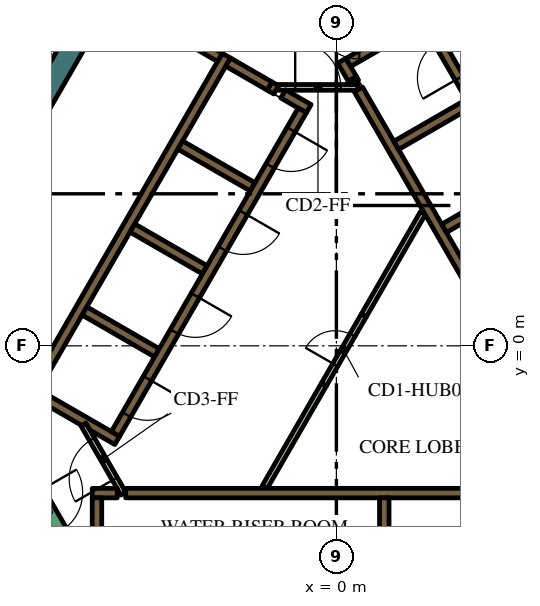
"""IFC4 building model, lengths in metres.
Left out: names, types, materials, properties, quantities, classifications, styles, units other than length and angle.
Written with IfcOpenShell. Run it as: python <this file> out.ifc"""

import sys

from ifc_helpers import new_model, si_unit, direction, frame, frame_2d, origin, place, context, subcontext, project, spatial, polyline, rectangle, outline, extrude, element, fill, save


model = new_model("IFC4")
c1 = context("Model", 3, precision=1e-05, world=origin(), true_north=direction((0.0, 1.0)))
c2 = subcontext(c1, "Body", "Model", "MODEL_VIEW")
j1 = project(units=[si_unit("LENGTHUNIT", "METRE"), si_unit("PLANEANGLEUNIT", "RADIAN")], contexts=[c1])
p1 = place(None, origin())
s1 = spatial("IfcSite", under=j1, at=p1, CompositionType="ELEMENT")
p2 = place(p1, origin())
s2 = spatial("IfcBuilding", under=s1, at=p2, CompositionType="ELEMENT")
p3 = place(p2, frame((0.0, 0.0, 309.0)))
s3 = spatial("IfcBuildingStorey", under=s2, at=p3, CompositionType="ELEMENT", Elevation=309.0)
p4 = place(p3, frame((1.989, 16.456, 0.0), z_axis=(0.0, 0.0, 1.0), x_axis=(0.49999102663, -0.8660305845, 0.0)))
e1 = element("IfcWall", 1, at=p4, inside=s3, PredefinedType="SOLIDWALL", context=c2, shape_type="SweptSolid", body=[
    extrude(rectangle(XDim=12.406, YDim=0.6, at=frame_2d((6.203, 0.0))), origin(), (0.0, 0.0, 1.0), 4.2),
])
p5 = place(p3, frame((-12.582, -1.892, 0.0), z_axis=(0.0, 0.0, 1.0), x_axis=(0.500003640647, 0.866023301845, 0.0)))
e2 = element("IfcWall", 2, at=p5, inside=s3, PredefinedType="SOLIDWALL", context=c2, shape_type="SweptSolid", body=[
    extrude(rectangle(XDim=15.858, YDim=0.6, at=frame_2d((7.929, 0.0))), origin(), (0.0, 0.0, 1.0), 4.2),
])
p6 = place(p3, frame((-5.545, -3.875, 0.0), z_axis=(0.0, 0.0, 1.0), x_axis=(1.0, 0.0, 0.0)))
e3 = element("IfcWall", 3, at=p6, inside=s3, PredefinedType="SOLIDWALL", context=c2, shape_type="SweptSolid", body=[
    extrude(rectangle(XDim=11.97, YDim=0.25, at=frame_2d((5.985, 0.0))), origin(), (0.0, 0.0, 1.0), 4.2),
])
p7 = place(p3, frame((-6.425, -3.875, 0.0), z_axis=(0.0, 0.0, 1.0), x_axis=(1.0, 0.0, 0.0)))
e4 = element("IfcWall", 4, at=p7, inside=s3, PredefinedType="SOLIDWALL", context=c2, shape_type="SweptSolid", body=[
    extrude(rectangle(XDim=0.658, YDim=0.25, at=frame_2d((0.329, 0.0))), origin(), (0.0, 0.0, 1.0), 4.2),
])
p8 = place(p3, frame((1.26, -4.0, 0.0), z_axis=(0.0, 0.0, 1.0), x_axis=(0.0, -1.0, 0.0)))
e5 = element("IfcWall", 5, at=p8, inside=s3, PredefinedType="SOLIDWALL", context=c2, shape_type="SweptSolid", body=[
    extrude(rectangle(XDim=2.2, YDim=0.25, at=frame_2d((1.1, 0.0))), origin(), (0.0, 0.0, 1.0), 4.2),
])
p9 = place(p3, frame((-6.3, -7.125, 0.0), z_axis=(0.0, 0.0, 1.0), x_axis=(0.0, 1.0, 0.0)))
e6 = element("IfcWall", 6, at=p9, inside=s3, PredefinedType="SOLIDWALL", context=c2, shape_type="SweptSolid", body=[
    extrude(rectangle(XDim=3.125, YDim=0.25, at=frame_2d((1.562, 0.0))), origin(), (0.0, 0.0, 1.0), 4.2),
])
p10 = place(p3, frame((0.473, 6.93, 0.0), z_axis=(0.0, 0.0, 1.0), x_axis=(-0.49972245349, 0.866185586049, 0.0)))
e7 = element("IfcWall", 7, at=p10, inside=s3, PredefinedType="SOLIDWALL", context=c2, shape_type="SweptSolid", body=[
    extrude(rectangle(XDim=0.11, YDim=0.25, at=frame_2d((0.055, 0.0))), origin(), (0.0, 0.0, 1.0), 4.2),
])
p11 = place(p3, frame((6.568, -3.627, 0.0), z_axis=(0.0, 0.0, 1.0), x_axis=(-0.499999455981, 0.866025717874, 0.0)))
e8 = element("IfcWall", 8, at=p11, inside=s3, PredefinedType="SOLIDWALL", context=c2, shape_type="SweptSolid", body=[
    extrude(rectangle(XDim=11.978, YDim=0.25, at=frame_2d((5.989, 0.0))), origin(), (0.0, 0.0, 1.0), 4.2),
])
p12 = place(p3, frame((0.417, 7.027, 0.0), z_axis=(0.0, 0.0, 1.0), x_axis=(-0.500210807569, 0.865903659763, 0.0)))
e9 = element("IfcWall", 9, at=p12, inside=s3, PredefinedType="SOLIDWALL", context=c2, shape_type="SweptSolid", body=[
    extrude(rectangle(XDim=0.548, YDim=0.25, at=frame_2d((0.274, 0.0))), origin(), (0.0, 0.0, 1.0), 4.2),
])
p13 = place(p3, frame((3.1, 9.064, 0.0), z_axis=(0.0, 0.0, 1.0), x_axis=(-0.866030133475, -0.499991807846, 0.0)))
e10 = element("IfcWall", 10, at=p13, inside=s3, PredefinedType="SOLIDWALL", context=c2, shape_type="SweptSolid", body=[
    extrude(rectangle(XDim=3.217, YDim=0.25, at=frame_2d((1.608, 0.0))), origin(), (0.0, 0.0, 1.0), 4.2),
])
p14 = place(p3, frame((1.574, 5.274, 0.0), z_axis=(0.0, 0.0, 1.0), x_axis=(0.866028486751, 0.499994660107, 0.0)))
e11 = element("IfcWall", 11, at=p14, inside=s3, PredefinedType="SOLIDWALL", context=c2, shape_type="SweptSolid", body=[
    extrude(rectangle(XDim=2.2, YDim=0.25, at=frame_2d((1.1, 0.0))), origin(), (0.0, 0.0, 1.0), 4.2),
])
p15 = place(p3, frame((2.834, 3.091, 0.0), z_axis=(0.0, 0.0, 1.0), x_axis=(0.866008176907, 0.50002983664, 0.0)))
e12 = element("IfcWall", 12, at=p15, inside=s3, PredefinedType="SOLIDWALL", context=c2, shape_type="SweptSolid", body=[
    extrude(rectangle(XDim=2.2, YDim=0.25, at=frame_2d((1.1, 0.0))), origin(), (0.0, 0.0, 1.0), 4.2),
])
p16 = place(p3, frame((-8.06, -1.311, 0.0), z_axis=(0.0, 0.0, 1.0), x_axis=(0.50000273126, 0.866023826885, 0.0)))
e13 = element("IfcWall", 13, at=p16, inside=s3, PredefinedType="SOLIDWALL", context=c2, shape_type="SweptSolid", body=[
    extrude(rectangle(XDim=10.33, YDim=0.25, at=frame_2d((5.165, 0.0))), origin(), (0.0, 0.0, 1.0), 4.2),
])
p17 = place(p3, frame((-1.758, 6.835, 0.0), z_axis=(0.0, 0.0, 1.0), x_axis=(0.865982457891, -0.500074377092, 0.0)))
e14 = element("IfcWall", 14, at=p17, inside=s3, PredefinedType="SOLIDWALL", context=c2, shape_type="SweptSolid", body=[
    extrude(rectangle(XDim=0.2, YDim=0.25, at=frame_2d((0.1, 0.0))), origin(), (0.0, 0.0, 1.0), 4.2),
])
p18 = place(p3, frame((-1.76, 6.836, 0.0), z_axis=(0.0, 0.0, 1.0), x_axis=(-0.865952863304, 0.500125622755, 0.0)))
e15 = element("IfcWall", 15, at=p18, inside=s3, PredefinedType="SOLIDWALL", context=c2, shape_type="SweptSolid", body=[
    extrude(rectangle(XDim=1.258, YDim=0.25, at=frame_2d((0.629, 0.0))), origin(), (0.0, 0.0, 1.0), 4.2),
])
p19 = place(p3, frame((-0.728, 6.24, 0.0), z_axis=(0.0, 0.0, 1.0), x_axis=(-0.865955664968, 0.500120771724, 0.0)))
e16 = element("IfcWall", 16, at=p19, inside=s3, PredefinedType="SOLIDWALL", context=c2, shape_type="SweptSolid", body=[
    extrude(rectangle(XDim=0.778, YDim=0.25, at=frame_2d((0.389, 0.0))), origin(), (0.0, 0.0, 1.0), 4.2),
])
for number, where, z_axis, x_axis in (
    (17, (-2.204, 4.182, 0.0), (0.0, 0.0, 1.0), (-0.866, 0.5, 0.0)),
    (18, (-5.369, 3.1, 0.0), (0.0, 0.0, 1.0), (0.866, -0.5, 0.0)),
    (19, (-4.724, -0.182, 0.0), (0.0, 0.0, 1.0), (-0.866, 0.5, 0.0)),
):
    element("IfcWall", number, at=place(p3, frame(where, z_axis=z_axis, x_axis=x_axis)), inside=s3, PredefinedType="SOLIDWALL", context=c2, shape_type="SweptSolid", body=[
        extrude(rectangle(XDim=2.2, YDim=0.25, at=frame_2d((1.1, 0.0))), origin(), (0.0, 0.0, 1.0), 4.2),
    ])
p20 = place(p3, origin())
e20 = element("IfcWall", 20, at=p20, inside=s3, PredefinedType="SOLIDWALL", context=c2, shape_type="SweptSolid", body=[
    extrude(outline(polyline([(-5.922, -2.257), (-5.922, -2.257), (-5.705, -2.382), (-5.83, -2.598), (-6.483, -2.221), (-6.591, -2.033), (-6.591, -2.033), (-6.7, -2.096), (-7.952, -1.373), (-7.827, -1.156), (-5.922, -2.257)])), origin(), (0.0, 0.0, 1.0), 4.2),
])
p21 = place(p3, frame((-3.066, 7.59, 0.0), z_axis=(0.0, 0.0, 1.0), x_axis=(-0.866081358704, 0.49990307071, 0.0)))
e21 = element("IfcWall", 21, at=p21, inside=s3, PredefinedType="SOLIDWALL", context=c2, shape_type="SweptSolid", body=[
    extrude(rectangle(XDim=0.858, YDim=0.25, at=frame_2d((0.429, 0.0))), origin(), (0.0, 0.0, 1.0), 4.2),
])
p22 = place(p3, frame((-1.887, -3.718, 0.0), z_axis=(0.0, 0.0, 1.0), x_axis=(0.500043732237, 0.866000153493, 0.0)))
e22 = element("IfcWall", 22, at=p22, inside=s3, PredefinedType="PARTITIONING", context=c2, shape_type="SweptSolid", body=[
    extrude(rectangle(XDim=3.114, YDim=0.15, at=frame_2d((1.557, 0.0))), origin(), (0.0, 0.0, 1.0), 3.55),
])
p23 = place(p3, frame((0.72, 0.797, 0.0), z_axis=(0.0, 0.0, 1.0), x_axis=(0.499984921984, 0.866034108906, 0.0)))
e23 = element("IfcWall", 23, at=p23, inside=s3, PredefinedType="PARTITIONING", context=c2, shape_type="SweptSolid", body=[
    extrude(rectangle(XDim=3.113, YDim=0.15, at=frame_2d((1.557, 0.0))), origin(), (0.0, 0.0, 1.0), 3.55),
])
p24 = place(p3, frame((8.565, -2.185, 0.0), z_axis=(0.0, 0.0, 1.0), x_axis=(-0.499997954832, 0.866026584559, 0.0)))
e24 = element("IfcWall", 24, at=p24, inside=s3, PredefinedType="SOLIDWALL", context=c2, shape_type="SweptSolid", body=[
    extrude(rectangle(XDim=12.35, YDim=0.25, at=frame_2d((6.175, 0.0))), origin(), (0.0, 0.0, 1.0), 4.2),
])
p25 = place(p24, frame((0.685, 0.0, 0.0)))
e25 = element("IfcOpeningElement", 25, at=p25, cuts=e24, PredefinedType="OPENING", context=c2, shape_type="SweptSolid", body=[
    extrude(rectangle(XDim=0.9, YDim=2.1, at=frame_2d((0.45, 1.05))), frame((0.0, 0.135, 0.0), z_axis=(0.0, -1.0, 0.0), x_axis=(1.0, 0.0, 0.0)), (0.0, 0.0, 1.0), 0.27),
])
p26 = place(p24, frame((3.105, 0.0, 0.0)))
e26 = element("IfcOpeningElement", 26, at=p26, cuts=e24, PredefinedType="OPENING", context=c2, shape_type="SweptSolid", body=[
    extrude(rectangle(XDim=1.1, YDim=2.1, at=frame_2d((0.55, 1.05))), frame((0.0, 0.135, 0.0), z_axis=(0.0, -1.0, 0.0), x_axis=(1.0, 0.0, 0.0)), (0.0, 0.0, 1.0), 0.27),
])
p27 = place(p24, frame((5.625, 0.0, 0.0)))
e27 = element("IfcOpeningElement", 27, at=p27, cuts=e24, PredefinedType="OPENING", context=c2, shape_type="SweptSolid", body=[
    extrude(rectangle(XDim=1.1, YDim=2.1, at=frame_2d((0.55, 1.05))), frame((0.0, 0.135, 0.0), z_axis=(0.0, -1.0, 0.0), x_axis=(1.0, 0.0, 0.0)), (0.0, 0.0, 1.0), 0.27),
])
p28 = place(p24, frame((8.145, 0.0, 0.0)))
e28 = element("IfcOpeningElement", 28, at=p28, cuts=e24, PredefinedType="OPENING", context=c2, shape_type="SweptSolid", body=[
    extrude(rectangle(XDim=1.1, YDim=2.1, at=frame_2d((0.55, 1.05))), frame((0.0, 0.135, 0.0), z_axis=(0.0, -1.0, 0.0), x_axis=(1.0, 0.0, 0.0)), (0.0, 0.0, 1.0), 0.27),
])
p29 = place(p24, frame((10.665, 0.0, 0.0)))
e29 = element("IfcOpeningElement", 29, at=p29, cuts=e24, PredefinedType="OPENING", context=c2, shape_type="SweptSolid", body=[
    extrude(rectangle(XDim=1.1, YDim=2.1, at=frame_2d((0.55, 1.05))), frame((0.0, 0.135, 0.0), z_axis=(0.0, -1.0, 0.0), x_axis=(1.0, 0.0, 0.0)), (0.0, 0.0, 1.0), 0.27),
])
p30 = place(p3, frame((-0.898, 6.194, 0.0), z_axis=(0.0, 0.0, 1.0), x_axis=(-0.499996202215, -0.866027596426, 0.0)))
e30 = element("IfcWall", 30, at=p30, inside=s3, PredefinedType="SOLIDWALL", context=c2, shape_type="SweptSolid", body=[
    extrude(rectangle(XDim=9.83, YDim=0.25, at=frame_2d((4.915, 0.0))), origin(), (0.0, 0.0, 1.0), 4.2),
])
p31 = place(p30, frame((0.585, 0.0, 0.0)))
e31 = element("IfcOpeningElement", 31, at=p31, cuts=e30, PredefinedType="OPENING", context=c2, shape_type="SweptSolid", body=[
    extrude(rectangle(XDim=1.1, YDim=2.1, at=frame_2d((0.55, 1.05))), frame((0.0, 0.135, 0.0), z_axis=(0.0, -1.0, 0.0), x_axis=(1.0, 0.0, 0.0)), (0.0, 0.0, 1.0), 0.27),
])
p32 = place(p30, frame((3.105, 0.0, 0.0)))
e32 = element("IfcOpeningElement", 32, at=p32, cuts=e30, PredefinedType="OPENING", context=c2, shape_type="SweptSolid", body=[
    extrude(rectangle(XDim=1.1, YDim=2.1, at=frame_2d((0.55, 1.05))), frame((0.0, 0.135, 0.0), z_axis=(0.0, -1.0, 0.0), x_axis=(1.0, 0.0, 0.0)), (0.0, 0.0, 1.0), 0.27),
])
p33 = place(p30, frame((5.625, 0.0, 0.0)))
e33 = element("IfcOpeningElement", 33, at=p33, cuts=e30, PredefinedType="OPENING", context=c2, shape_type="SweptSolid", body=[
    extrude(rectangle(XDim=1.1, YDim=2.1, at=frame_2d((0.55, 1.05))), frame((0.0, 0.135, 0.0), z_axis=(0.0, -1.0, 0.0), x_axis=(1.0, 0.0, 0.0)), (0.0, 0.0, 1.0), 0.27),
])
p34 = place(p30, frame((8.145, 0.0, 0.0)))
e34 = element("IfcOpeningElement", 34, at=p34, cuts=e30, PredefinedType="OPENING", context=c2, shape_type="SweptSolid", body=[
    extrude(rectangle(XDim=1.1, YDim=2.1, at=frame_2d((0.55, 1.05))), frame((0.0, 0.135, 0.0), z_axis=(0.0, -1.0, 0.0), x_axis=(1.0, 0.0, 0.0)), (0.0, 0.0, 1.0), 0.27),
])
p35 = place(p3, frame((-8.103, -3.466, 0.0), z_axis=(0.0, 0.0, 1.0), x_axis=(0.500078061341, -0.865980330357, 0.0)))
e35 = element("IfcWall", 35, at=p35, inside=s3, PredefinedType="SOLIDWALL", context=c2, shape_type="SweptSolid", body=[
    extrude(rectangle(XDim=2.1, YDim=0.4, at=frame_2d((1.05, 0.0))), origin(), (0.0, 0.0, 1.0), 4.2),
])
p36 = place(p35, frame((0.45, 0.0, 0.0)))
e36 = element("IfcOpeningElement", 36, at=p36, cuts=e35, PredefinedType="OPENING", context=c2, shape_type="SweptSolid", body=[
    extrude(rectangle(XDim=1.2, YDim=2.1, at=frame_2d((0.6, 1.05))), frame((0.0, 0.21, 0.0), z_axis=(0.0, -1.0, 0.0), x_axis=(1.0, 0.0, 0.0)), (0.0, 0.0, 1.0), 0.42),
])
p37 = place(p3, frame((-0.33, -1.022, 0.0), z_axis=(0.0, 0.0, 1.0), x_axis=(0.500027713859, 0.866009402589, 0.0)))
e37 = element("IfcWall", 37, at=p37, inside=s3, PredefinedType="PARTITIONING", context=c2, shape_type="SweptSolid", body=[
    extrude(rectangle(XDim=2.1, YDim=0.15, at=frame_2d((1.05, 0.0))), origin(), (0.0, 0.0, 1.0), 3.55),
])
p38 = place(p37, frame((0.6, 0.0, 0.0)))
e38 = element("IfcOpeningElement", 38, at=p38, cuts=e37, PredefinedType="OPENING", context=c2, shape_type="SweptSolid", body=[
    extrude(rectangle(XDim=0.9, YDim=2.1, at=frame_2d((0.45, 1.05))), frame((0.0, 0.085, 0.0), z_axis=(0.0, -1.0, 0.0), x_axis=(1.0, 0.0, 0.0)), (0.0, 0.0, 1.0), 0.17),
])
p39 = place(p3, frame((-1.534, 6.8, 0.0), z_axis=(0.0, 0.0, 1.0), x_axis=(1.0, 0.0, 0.0)))
e39 = element("IfcWall", 39, at=p39, inside=s3, PredefinedType="PARTITIONING", context=c2, shape_type="SweptSolid", body=[
    extrude(rectangle(XDim=2.1, YDim=0.15, at=frame_2d((1.05, 0.0))), origin(), (0.0, 0.0, 1.0), 3.55),
])
p40 = place(p39, frame((0.45, 0.0, 0.0)))
e40 = element("IfcOpeningElement", 40, at=p40, cuts=e39, PredefinedType="OPENING", context=c2, shape_type="SweptSolid", body=[
    extrude(rectangle(XDim=1.2, YDim=2.1, at=frame_2d((0.6, 1.05))), frame((0.0, 0.085, 0.0), z_axis=(0.0, -1.0, 0.0), x_axis=(1.0, 0.0, 0.0)), (0.0, 0.0, 1.0), 0.17),
])
p41 = place(p3, frame((-5.606, -3.89, 0.0), z_axis=(0.0, 0.0, 1.0), x_axis=(-0.500027713859, 0.866009402589, 0.0)))
e41 = element("IfcWall", 41, at=p41, inside=s3, PredefinedType="PARTITIONING", context=c2, shape_type="SweptSolid", body=[
    extrude(rectangle(XDim=2.1, YDim=0.15, at=frame_2d((1.05, 0.0))), origin(), (0.0, 0.0, 1.0), 3.55),
])
p42 = place(p41, frame((0.45, 0.0, 0.0)))
e42 = element("IfcOpeningElement", 42, at=p42, cuts=e41, PredefinedType="OPENING", context=c2, shape_type="SweptSolid", body=[
    extrude(rectangle(XDim=1.2, YDim=2.1, at=frame_2d((0.6, 1.05))), frame((0.0, 0.085, 0.0), z_axis=(0.0, -1.0, 0.0), x_axis=(1.0, 0.0, 0.0)), (0.0, 0.0, 1.0), 0.17),
])
p43 = place(p29, origin())
e43 = element("IfcDoor", 43, at=p43, inside=s3, OperationType="DOUBLE_DOOR_SLIDING", PredefinedType="DOOR", context=c2, shape_type="SweptSolid", body=[
    extrude(rectangle(XDim=1.1, YDim=2.1, at=frame_2d((0.55, 1.05))), frame((0.0, 0.025, 0.0), z_axis=(0.0, -1.0, 0.0), x_axis=(1.0, 0.0, 0.0)), (0.0, 0.0, 1.0), 0.05),
])
fill(e29, e43)
p44 = place(p31, origin())
e44 = element("IfcDoor", 44, at=p44, inside=s3, OperationType="DOUBLE_DOOR_SLIDING", PredefinedType="DOOR", context=c2, shape_type="SweptSolid", body=[
    extrude(rectangle(XDim=1.1, YDim=2.1, at=frame_2d((0.55, 1.05))), frame((0.0, 0.025, 0.0), z_axis=(0.0, -1.0, 0.0), x_axis=(1.0, 0.0, 0.0)), (0.0, 0.0, 1.0), 0.05),
])
fill(e31, e44)
p45 = place(p32, origin())
e45 = element("IfcDoor", 45, at=p45, inside=s3, OperationType="DOUBLE_DOOR_SLIDING", PredefinedType="DOOR", context=c2, shape_type="SweptSolid", body=[
    extrude(rectangle(XDim=1.1, YDim=2.1, at=frame_2d((0.55, 1.05))), frame((0.0, 0.025, 0.0), z_axis=(0.0, -1.0, 0.0), x_axis=(1.0, 0.0, 0.0)), (0.0, 0.0, 1.0), 0.05),
])
fill(e32, e45)
p46 = place(p33, origin())
e46 = element("IfcDoor", 46, at=p46, inside=s3, OperationType="DOUBLE_DOOR_SLIDING", PredefinedType="DOOR", context=c2, shape_type="SweptSolid", body=[
    extrude(rectangle(XDim=1.1, YDim=2.1, at=frame_2d((0.55, 1.05))), frame((0.0, 0.025, 0.0), z_axis=(0.0, -1.0, 0.0), x_axis=(1.0, 0.0, 0.0)), (0.0, 0.0, 1.0), 0.05),
])
fill(e33, e46)
p47 = place(p34, origin())
e47 = element("IfcDoor", 47, at=p47, inside=s3, OperationType="DOUBLE_DOOR_SLIDING", PredefinedType="DOOR", context=c2, shape_type="SweptSolid", body=[
    extrude(rectangle(XDim=1.1, YDim=2.1, at=frame_2d((0.55, 1.05))), frame((0.0, 0.025, 0.0), z_axis=(0.0, -1.0, 0.0), x_axis=(1.0, 0.0, 0.0)), (0.0, 0.0, 1.0), 0.05),
])
fill(e34, e47)
p48 = place(p36, origin())
e48 = element("IfcDoor", 48, at=p48, inside=s3, OperationType="SINGLE_SWING_LEFT", PredefinedType="DOOR", context=c2, shape_type="SweptSolid", body=[
    extrude(rectangle(XDim=1.2, YDim=2.1, at=frame_2d((0.6, 1.05))), frame((0.0, 0.025, 0.0), z_axis=(0.0, -1.0, 0.0), x_axis=(1.0, 0.0, 0.0)), (0.0, 0.0, 1.0), 0.05),
])
fill(e36, e48)
p49 = place(p38, origin())
e49 = element("IfcDoor", 49, at=p49, inside=s3, OperationType="SINGLE_SWING_LEFT", PredefinedType="DOOR", context=c2, shape_type="SweptSolid", body=[
    extrude(rectangle(XDim=0.9, YDim=2.1, at=frame_2d((0.45, 1.05))), frame((0.0, 0.025, 0.0), z_axis=(0.0, -1.0, 0.0), x_axis=(1.0, 0.0, 0.0)), (0.0, 0.0, 1.0), 0.05),
])
fill(e38, e49)
p50 = place(p40, origin())
e50 = element("IfcDoor", 50, at=p50, inside=s3, OperationType="SINGLE_SWING_LEFT", PredefinedType="DOOR", context=c2, shape_type="SweptSolid", body=[
    extrude(rectangle(XDim=1.2, YDim=2.1, at=frame_2d((0.6, 1.05))), frame((0.0, 0.025, 0.0), z_axis=(0.0, -1.0, 0.0), x_axis=(1.0, 0.0, 0.0)), (0.0, 0.0, 1.0), 0.05),
])
fill(e40, e50)
p51 = place(p42, origin())
e51 = element("IfcDoor", 51, at=p51, inside=s3, OperationType="SINGLE_SWING_LEFT", PredefinedType="DOOR", context=c2, shape_type="SweptSolid", body=[
    extrude(rectangle(XDim=1.2, YDim=2.1, at=frame_2d((0.6, 1.05))), frame((0.0, 0.025, 0.0), z_axis=(0.0, -1.0, 0.0), x_axis=(1.0, 0.0, 0.0)), (0.0, 0.0, 1.0), 0.05),
])
fill(e42, e51)
save(model, sys.argv[1])
